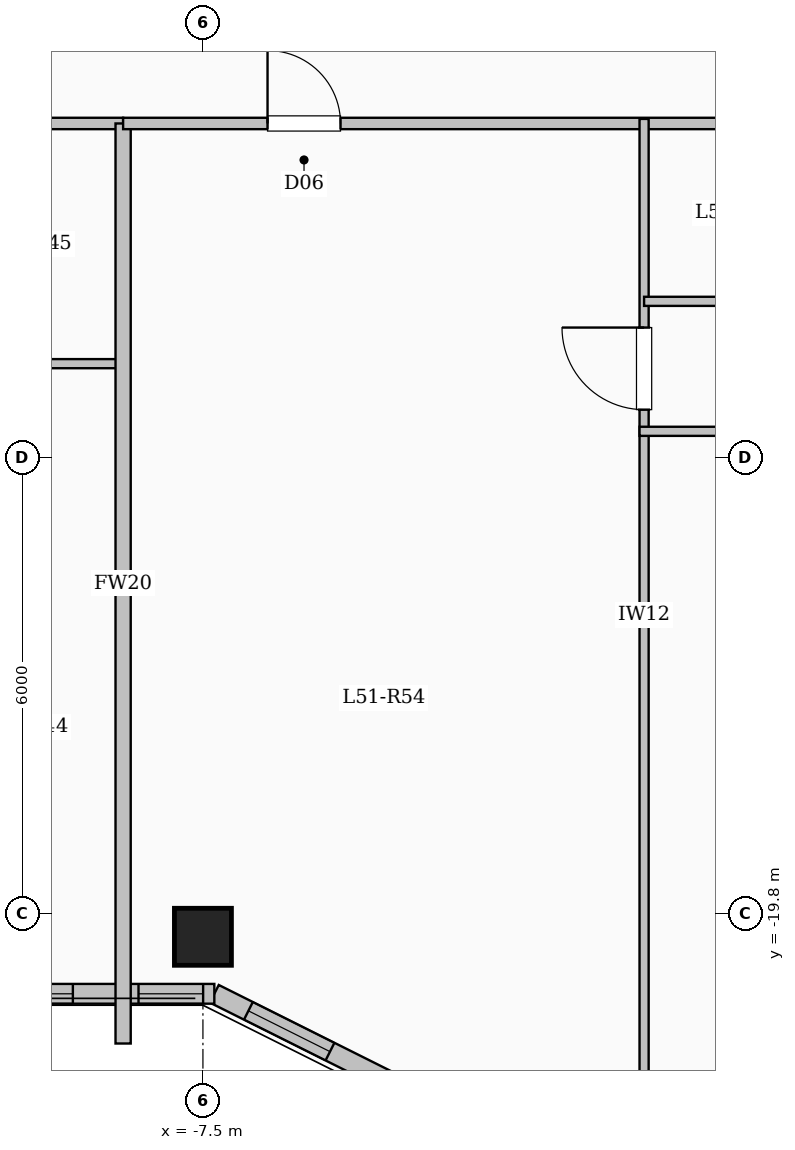
"""IFC4 building model, lengths in metres.
Left out: names, types, materials, properties, quantities, classifications, styles, units other than length and angle.
Written with IfcOpenShell. Run it as: python <this file> out.ifc"""

import sys

from ifc_helpers import new_model, si_unit, direction, frame, frame_2d, origin, origin_2d, place, context, subcontext, project, spatial, rectangle, extrude, element, fill, save


model = new_model("IFC4")
c1 = context("Model", 3, precision=1e-05, world=origin(), true_north=direction((0.0, 1.0)))
c2 = subcontext(c1, "Body", "Model", "MODEL_VIEW")
j1 = project(units=[si_unit("LENGTHUNIT", "METRE"), si_unit("PLANEANGLEUNIT", "RADIAN")], contexts=[c1])
p1 = place(None, origin())
s1 = spatial("IfcSite", under=j1, at=p1, CompositionType="ELEMENT")
p2 = place(p1, origin())
s2 = spatial("IfcBuilding", under=s1, at=p2, CompositionType="ELEMENT")
p3 = place(p2, frame((0.0, 0.0, 190.25)))
s3 = spatial("IfcBuildingStorey", under=s2, at=p3, CompositionType="ELEMENT", Elevation=190.25)
p4 = place(p3, frame((-7.5, -20.1, 0.0), z_axis=(0.0, 0.0, 1.0), x_axis=(1.0, 0.0, 0.0)))
e1 = element("IfcColumn", 1, at=p4, inside=s3, PredefinedType="COLUMN", context=c2, shape_type="SweptSolid", body=[
    extrude(rectangle(XDim=0.75, YDim=0.75, at=origin_2d()), origin(), (0.0, 0.0, 1.0), 3.35),
])
p5 = place(p3, frame((-4.35, -22.35, 0.0), z_axis=(0.0, 0.0, 1.0), x_axis=(-0.894427191, 0.4472135955, 0.0)))
e2 = element("IfcWall", 2, at=p5, inside=s3, PredefinedType="SOLIDWALL", context=c2, shape_type="SweptSolid", body=[
    extrude(rectangle(XDim=3.354, YDim=0.26, at=frame_2d((1.677, 0.0))), origin(), (0.0, 0.0, 1.0), 3.1),
])
p6 = place(p5, frame((1.653, 0.0, 0.95)))
e3 = element("IfcOpeningElement", 3, at=p6, cuts=e2, PredefinedType="OPENING", context=c2, shape_type="SweptSolid", body=[
    extrude(rectangle(XDim=1.2, YDim=1.5, at=frame_2d((0.6, 0.75))), frame((0.0, 0.14, 0.0), z_axis=(0.0, -1.0, 0.0), x_axis=(1.0, 0.0, 0.0)), (0.0, 0.0, 1.0), 0.28),
])
p7 = place(p3, frame((-7.35, -20.85, 0.0), z_axis=(0.0, 0.0, 1.0), x_axis=(-1.0, 0.0, 0.0)))
e4 = element("IfcWall", 4, at=p7, inside=s3, PredefinedType="SOLIDWALL", context=c2, shape_type="SweptSolid", body=[
    extrude(rectangle(XDim=11.1, YDim=0.26, at=frame_2d((5.55, 0.0))), origin(), (0.0, 0.0, 1.0), 3.1),
])
p8 = place(p7, frame((0.147, 0.0, 0.95)))
e5 = element("IfcOpeningElement", 5, at=p8, cuts=e4, PredefinedType="OPENING", context=c2, shape_type="SweptSolid", body=[
    extrude(rectangle(XDim=0.85, YDim=1.5, at=frame_2d((0.425, 0.75))), frame((0.0, 0.14, 0.0), z_axis=(0.0, -1.0, 0.0), x_axis=(1.0, 0.0, 0.0)), (0.0, 0.0, 1.0), 0.28),
])
p9 = place(p7, frame((1.861, 0.0, 0.95)))
e6 = element("IfcOpeningElement", 6, at=p9, cuts=e4, PredefinedType="OPENING", context=c2, shape_type="SweptSolid", body=[
    extrude(rectangle(XDim=1.2, YDim=1.5, at=frame_2d((0.6, 0.75))), frame((0.0, 0.14, 0.0), z_axis=(0.0, -1.0, 0.0), x_axis=(1.0, 0.0, 0.0)), (0.0, 0.0, 1.0), 0.28),
])
p10 = place(p7, frame((4.397, 0.0, 0.95)))
e7 = element("IfcOpeningElement", 7, at=p10, cuts=e4, PredefinedType="OPENING", context=c2, shape_type="SweptSolid", body=[
    extrude(rectangle(XDim=1.2, YDim=1.5, at=frame_2d((0.6, 0.75))), frame((0.0, 0.14, 0.0), z_axis=(0.0, -1.0, 0.0), x_axis=(1.0, 0.0, 0.0)), (0.0, 0.0, 1.0), 0.28),
])
p11 = place(p7, frame((6.85, 0.0, 0.95)))
e8 = element("IfcOpeningElement", 8, at=p11, cuts=e4, PredefinedType="OPENING", context=c2, shape_type="SweptSolid", body=[
    extrude(rectangle(XDim=1.2, YDim=1.5, at=frame_2d((0.6, 0.75))), frame((0.0, 0.14, 0.0), z_axis=(0.0, -1.0, 0.0), x_axis=(1.0, 0.0, 0.0)), (0.0, 0.0, 1.0), 0.28),
])
p12 = place(p7, frame((9.194, 0.0, 0.95)))
e9 = element("IfcOpeningElement", 9, at=p12, cuts=e4, PredefinedType="OPENING", context=c2, shape_type="SweptSolid", body=[
    extrude(rectangle(XDim=1.2, YDim=1.5, at=frame_2d((0.6, 0.75))), frame((0.0, 0.14, 0.0), z_axis=(0.0, -1.0, 0.0), x_axis=(1.0, 0.0, 0.0)), (0.0, 0.0, 1.0), 0.28),
])
p13 = place(p3, frame((-18.35, -9.4, 0.0), z_axis=(0.0, 0.0, 1.0), x_axis=(1.0, 0.0, 0.0)))
e10 = element("IfcWall", 10, at=p13, inside=s3, PredefinedType="PARTITIONING", context=c2, shape_type="SweptSolid", body=[
    extrude(rectangle(XDim=9.8, YDim=0.15, at=frame_2d((4.9, 0.0))), origin(), (0.0, 0.0, 1.0), 3.1),
])
p14 = place(p13, frame((0.7, 0.0, 0.0)))
e11 = element("IfcOpeningElement", 11, at=p14, cuts=e10, PredefinedType="OPENING", context=c2, shape_type="SweptSolid", body=[
    extrude(rectangle(XDim=0.96, YDim=2.15, at=frame_2d((0.48, 1.075))), frame((0.0, 0.085, 0.0), z_axis=(0.0, -1.0, 0.0), x_axis=(1.0, 0.0, 0.0)), (0.0, 0.0, 1.0), 0.17),
])
p15 = place(p13, frame((5.38, 0.0, 0.0)))
e12 = element("IfcOpeningElement", 12, at=p15, cuts=e10, PredefinedType="OPENING", context=c2, shape_type="SweptSolid", body=[
    extrude(rectangle(XDim=0.96, YDim=2.15, at=frame_2d((0.48, 1.075))), frame((0.0, 0.085, 0.0), z_axis=(0.0, -1.0, 0.0), x_axis=(1.0, 0.0, 0.0)), (0.0, 0.0, 1.0), 0.17),
])
p16 = place(p3, frame((-11.096, -12.56, 0.0), z_axis=(0.0, 0.0, 1.0), x_axis=(1.0, 0.0, 0.0)))
e13 = element("IfcWall", 13, at=p16, inside=s3, PredefinedType="PARTITIONING", context=c2, shape_type="SweptSolid", body=[
    extrude(rectangle(XDim=2.556, YDim=0.12, at=frame_2d((1.278, 0.0))), origin(), (0.0, 0.0, 1.0), 2.725),
])
p17 = place(p3, frame((-8.55, -21.504, 0.0), z_axis=(0.0, 0.0, 1.0), x_axis=(0.0, 1.0, 0.0)))
e14 = element("IfcWall", 14, at=p17, inside=s3, PredefinedType="SOLIDWALL", context=c2, shape_type="SweptSolid", body=[
    extrude(rectangle(XDim=12.104, YDim=0.2, at=frame_2d((6.052, 0.0))), origin(), (0.0, 0.0, 1.0), 3.1),
])
p18 = place(p3, frame((-8.55, -9.4, 0.0), z_axis=(0.0, 0.0, 1.0), x_axis=(1.0, 0.0, 0.0)))
e15 = element("IfcWall", 15, at=p18, inside=s3, PredefinedType="PARTITIONING", context=c2, shape_type="SweptSolid", body=[
    extrude(rectangle(XDim=17.1, YDim=0.15, at=frame_2d((8.55, 0.0))), origin(), (0.0, 0.0, 1.0), 3.1),
])
p19 = place(p18, frame((1.9, 0.0, 0.0)))
e16 = element("IfcOpeningElement", 16, at=p19, cuts=e15, PredefinedType="OPENING", context=c2, shape_type="SweptSolid", body=[
    extrude(rectangle(XDim=0.96, YDim=2.15, at=frame_2d((0.48, 1.075))), frame((0.0, 0.085, 0.0), z_axis=(0.0, -1.0, 0.0), x_axis=(1.0, 0.0, 0.0)), (0.0, 0.0, 1.0), 0.17),
])
p20 = place(p3, frame((-1.696, -22.38, 0.0), z_axis=(0.0, 0.0, 1.0), x_axis=(0.0, 1.0, 0.0)))
e17 = element("IfcWall", 17, at=p20, inside=s3, PredefinedType="PARTITIONING", context=c2, shape_type="SweptSolid", body=[
    extrude(rectangle(XDim=13.04, YDim=0.12, at=frame_2d((6.52, 0.0))), origin(), (0.0, 0.0, 1.0), 3.1),
])
p21 = place(p20, frame((9.215, 0.0, 0.0)))
e18 = element("IfcOpeningElement", 18, at=p21, cuts=e17, PredefinedType="OPENING", context=c2, shape_type="SweptSolid", body=[
    extrude(rectangle(XDim=1.08, YDim=2.15, at=frame_2d((0.54, 1.075))), frame((0.0, 0.07, 0.0), z_axis=(0.0, -1.0, 0.0), x_axis=(1.0, 0.0, 0.0)), (0.0, 0.0, 1.0), 0.14),
])
p22 = place(p3, frame((-1.696, -11.74, 0.0), z_axis=(0.0, 0.0, 1.0), x_axis=(1.0, 0.0, 0.0)))
e19 = element("IfcWall", 19, at=p22, inside=s3, PredefinedType="PARTITIONING", context=c2, shape_type="SweptSolid", body=[
    extrude(rectangle(XDim=5.393, YDim=0.12, at=frame_2d((2.697, 0.0))), origin(), (0.0, 0.0, 1.0), 3.1),
])
p23 = place(p22, frame((2.256, 0.0, 0.0)))
e20 = element("IfcOpeningElement", 20, at=p23, cuts=e19, PredefinedType="OPENING", context=c2, shape_type="SweptSolid", body=[
    extrude(rectangle(XDim=0.88, YDim=2.1, at=frame_2d((0.44, 1.05))), frame((0.0, 0.07, 0.0), z_axis=(0.0, -1.0, 0.0), x_axis=(1.0, 0.0, 0.0)), (0.0, 0.0, 1.0), 0.14),
])
p24 = place(p3, frame((-1.756, -13.45, 0.0), z_axis=(0.0, 0.0, 1.0), x_axis=(1.0, 0.0, 0.0)))
e21 = element("IfcWall", 21, at=p24, inside=s3, PredefinedType="PARTITIONING", context=c2, shape_type="SweptSolid", body=[
    extrude(rectangle(XDim=10.366, YDim=0.12, at=frame_2d((5.183, 0.0))), origin(), (0.0, 0.0, 1.0), 3.1),
])
p25 = place(p24, frame((1.256, 0.0, 0.0)))
e22 = element("IfcOpeningElement", 22, at=p25, cuts=e21, PredefinedType="OPENING", context=c2, shape_type="SweptSolid", body=[
    extrude(rectangle(XDim=0.88, YDim=2.1, at=frame_2d((0.44, 1.05))), frame((0.0, 0.07, 0.0), z_axis=(0.0, -1.0, 0.0), x_axis=(1.0, 0.0, 0.0)), (0.0, 0.0, 1.0), 0.14),
])
p26 = place(p24, frame((4.648, 0.0, 0.0)))
e23 = element("IfcOpeningElement", 23, at=p26, cuts=e21, PredefinedType="OPENING", context=c2, shape_type="SweptSolid", body=[
    extrude(rectangle(XDim=0.88, YDim=2.1, at=frame_2d((0.44, 1.05))), frame((0.0, 0.07, 0.0), z_axis=(0.0, -1.0, 0.0), x_axis=(1.0, 0.0, 0.0)), (0.0, 0.0, 1.0), 0.14),
])
p27 = place(p24, frame((8.04, 0.0, 0.0)))
e24 = element("IfcOpeningElement", 24, at=p27, cuts=e21, PredefinedType="OPENING", context=c2, shape_type="SweptSolid", body=[
    extrude(rectangle(XDim=0.88, YDim=2.1, at=frame_2d((0.44, 1.05))), frame((0.0, 0.07, 0.0), z_axis=(0.0, -1.0, 0.0), x_axis=(1.0, 0.0, 0.0)), (0.0, 0.0, 1.0), 0.14),
])
p28 = place(p6, origin())
e25 = element("IfcWindow", 25, at=p28, inside=s3, PartitioningType="SINGLE_PANEL", PredefinedType="WINDOW", context=c2, shape_type="SweptSolid", body=[
    extrude(rectangle(XDim=1.2, YDim=1.5, at=frame_2d((0.6, 0.75))), frame((0.0, 0.03, 0.0), z_axis=(0.0, -1.0, 0.0), x_axis=(1.0, 0.0, 0.0)), (0.0, 0.0, 1.0), 0.06),
])
fill(e3, e25)
p29 = place(p8, origin())
e26 = element("IfcWindow", 26, at=p29, inside=s3, PartitioningType="SINGLE_PANEL", PredefinedType="WINDOW", context=c2, shape_type="SweptSolid", body=[
    extrude(rectangle(XDim=0.85, YDim=1.5, at=frame_2d((0.425, 0.75))), frame((0.0, 0.03, 0.0), z_axis=(0.0, -1.0, 0.0), x_axis=(1.0, 0.0, 0.0)), (0.0, 0.0, 1.0), 0.06),
])
fill(e5, e26)
p30 = place(p9, origin())
e27 = element("IfcWindow", 27, at=p30, inside=s3, PartitioningType="SINGLE_PANEL", PredefinedType="WINDOW", context=c2, shape_type="SweptSolid", body=[
    extrude(rectangle(XDim=1.2, YDim=1.5, at=frame_2d((0.6, 0.75))), frame((0.0, 0.03, 0.0), z_axis=(0.0, -1.0, 0.0), x_axis=(1.0, 0.0, 0.0)), (0.0, 0.0, 1.0), 0.06),
])
fill(e6, e27)
p31 = place(p19, origin())
e28 = element("IfcDoor", 28, at=p31, inside=s3, OperationType="SINGLE_SWING_LEFT", PredefinedType="DOOR", context=c2, shape_type="SweptSolid", body=[
    extrude(rectangle(XDim=0.96, YDim=2.15, at=frame_2d((0.48, 1.075))), frame((0.0, 0.025, 0.0), z_axis=(0.0, -1.0, 0.0), x_axis=(1.0, 0.0, 0.0)), (0.0, 0.0, 1.0), 0.05),
])
fill(e16, e28)
p32 = place(p21, origin())
e29 = element("IfcDoor", 29, at=p32, inside=s3, OperationType="SINGLE_SWING_RIGHT", PredefinedType="DOOR", context=c2, shape_type="SweptSolid", body=[
    extrude(rectangle(XDim=1.08, YDim=2.15, at=frame_2d((0.54, 1.075))), frame((0.0, 0.025, 0.0), z_axis=(0.0, -1.0, 0.0), x_axis=(1.0, 0.0, 0.0)), (0.0, 0.0, 1.0), 0.05),
])
fill(e18, e29)
save(model, sys.argv[1])
